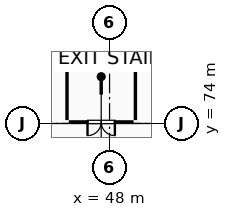
"""IFC4 building model, lengths in metres.
Left out: names, types, materials, properties, quantities, classifications, styles, units other than length and angle.
Written with IfcOpenShell. Run it as: python <this file> out.ifc"""

import sys

from ifc_helpers import new_model, si_unit, direction, frame, frame_2d, origin, place, context, subcontext, project, spatial, rectangle, extrude, element, fill, save


model = new_model("IFC4")
c1 = context("Model", 3, precision=1e-05, world=origin(), true_north=direction((0.0, 1.0)))
c2 = subcontext(c1, "Body", "Model", "MODEL_VIEW")
j1 = project(units=[si_unit("LENGTHUNIT", "METRE"), si_unit("PLANEANGLEUNIT", "RADIAN")], contexts=[c1])
p1 = place(None, origin())
s1 = spatial("IfcSite", under=j1, at=p1, CompositionType="ELEMENT")
p2 = place(p1, origin())
s2 = spatial("IfcBuilding", under=s1, at=p2, CompositionType="ELEMENT")
p3 = place(p2, frame((0.0, 0.0, 10.2)))
s3 = spatial("IfcBuildingStorey", under=s2, at=p3, CompositionType="ELEMENT", Elevation=10.2)
p4 = place(p3, frame((45.2, 74.22, 0.0), z_axis=(0.0, 0.0, 1.0), x_axis=(0.0, 1.0, 0.0)))
e1 = element("IfcWall", 1, at=p4, inside=s3, PredefinedType="PARTITIONING", context=c2, shape_type="SweptSolid", body=[
    extrude(rectangle(XDim=3.36, YDim=0.2, at=frame_2d((1.68, 0.0))), origin(), (0.0, 0.0, 1.0), 4.53),
])
p5 = place(p3, frame((45.32, 77.7, 0.0), z_axis=(0.0, 0.0, 1.0), x_axis=(1.0, 0.0, 0.0)))
e2 = element("IfcWall", 2, at=p5, inside=s3, PredefinedType="PARTITIONING", context=c2, shape_type="SweptSolid", body=[
    extrude(rectangle(XDim=4.26, YDim=0.2, at=frame_2d((2.13, 0.0))), origin(), (0.0, 0.0, 1.0), 4.53),
])
p6 = place(p3, frame((49.7, 77.58, 0.0), z_axis=(0.0, 0.0, 1.0), x_axis=(0.0, -1.0, 0.0)))
e3 = element("IfcWall", 3, at=p6, inside=s3, PredefinedType="PARTITIONING", context=c2, shape_type="SweptSolid", body=[
    extrude(rectangle(XDim=3.36, YDim=0.2, at=frame_2d((1.68, 0.0))), origin(), (0.0, 0.0, 1.0), 4.53),
])
p7 = place(p3, frame((49.58, 74.1, 0.0), z_axis=(0.0, 0.0, 1.0), x_axis=(-1.0, 0.0, 0.0)))
e4 = element("IfcWall", 4, at=p7, inside=s3, PredefinedType="PARTITIONING", context=c2, shape_type="SweptSolid", body=[
    extrude(rectangle(XDim=4.26, YDim=0.2, at=frame_2d((2.13, 0.0))), origin(), (0.0, 0.0, 1.0), 4.53),
])
p8 = place(p7, frame((1.23, 0.0, 0.0)))
e5 = element("IfcOpeningElement", 5, at=p8, cuts=e4, PredefinedType="OPENING", context=c2, shape_type="SweptSolid", body=[
    extrude(rectangle(XDim=1.8, YDim=2.15, at=frame_2d((0.9, 1.075))), frame((0.0, 0.11, 0.0), z_axis=(0.0, -1.0, 0.0), x_axis=(1.0, 0.0, 0.0)), (0.0, 0.0, 1.0), 0.22),
])
p9 = place(p8, origin())
e6 = element("IfcDoor", 6, at=p9, inside=s3, OperationType="DOUBLE_DOOR_SINGLE_SWING", PredefinedType="DOOR", context=c2, shape_type="SweptSolid", body=[
    extrude(rectangle(XDim=1.8, YDim=2.15, at=frame_2d((0.9, 1.075))), frame((0.0, 0.025, 0.0), z_axis=(0.0, -1.0, 0.0), x_axis=(1.0, 0.0, 0.0)), (0.0, 0.0, 1.0), 0.05),
])
fill(e5, e6)
save(model, sys.argv[1])
